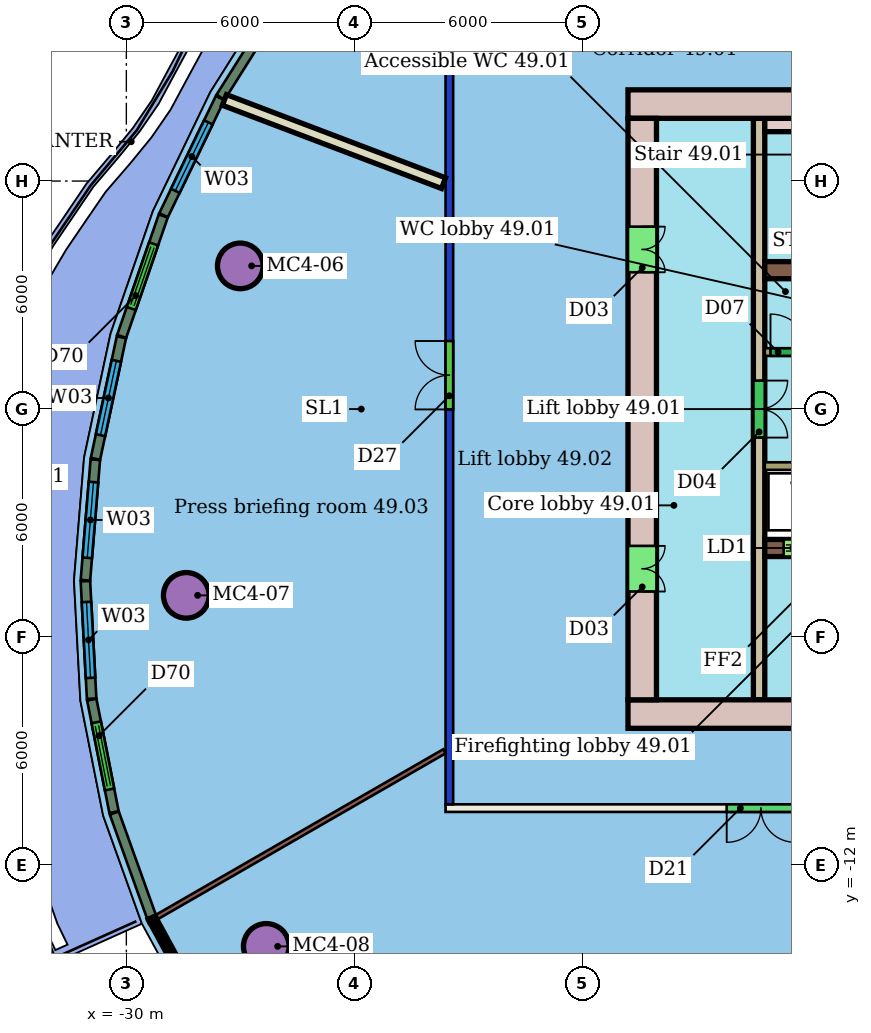
"""IFC4 building model, lengths in metres.
Left out: names, types, materials, properties, quantities, classifications, styles, units other than length and angle.
Written with IfcOpenShell. Run it as: python <this file> out.ifc"""

import sys

from ifc_helpers import new_model, si_unit, direction, frame, frame_2d, origin, origin_2d, place, context, subcontext, project, spatial, rectangle, hollow_circle, extrude, element, fill, save


model = new_model("IFC4")
c1 = context("Model", 3, precision=1e-05, world=origin(), true_north=direction((0.0, 1.0)))
c2 = subcontext(c1, "Body", "Model", "MODEL_VIEW")
j1 = project(units=[si_unit("LENGTHUNIT", "METRE"), si_unit("PLANEANGLEUNIT", "RADIAN")], contexts=[c1])
p1 = place(None, origin())
s1 = spatial("IfcSite", under=j1, at=p1, CompositionType="ELEMENT")
p2 = place(p1, origin())
s2 = spatial("IfcBuilding", under=s1, at=p2, CompositionType="ELEMENT")
p3 = place(p2, frame((0.0, 0.0, 202.9)))
s3 = spatial("IfcBuildingStorey", under=s2, at=p3, CompositionType="ELEMENT", Elevation=202.9)
for number, where, z_axis, x_axis in (
    (1, (-27.003, 3.768, 0.0), (0.0, 0.0, 1.0), (1.0, 0.0, 0.0)),
    (2, (-28.424, -4.901, 0.0), (0.0, 0.0, 1.0), (1.0, 0.0, 0.0)),
    (3, (-26.318, -14.137, 0.0), (0.0, 0.0, 1.0), (1.0, 0.0, 0.0)),
):
    element("IfcColumn", number, at=place(p3, frame(where, z_axis=z_axis, x_axis=x_axis)), inside=s3, PredefinedType="COLUMN", context=c2, shape_type="SweptSolid", body=[
        extrude(hollow_circle(Radius=0.6, WallThickness=0.045, at=origin_2d()), origin(), (0.0, 0.0, 1.0), 3.45),
    ])
p4 = place(p3, frame((9.6, -10.5, 0.0), z_axis=(0.0, 0.0, 1.0), x_axis=(-1.0, 0.0, 0.0)))
e4 = element("IfcWall", 4, at=p4, inside=s3, PredefinedType="PARTITIONING", context=c2, shape_type="SweptSolid", body=[
    extrude(rectangle(XDim=31.2, YDim=0.2, at=frame_2d((15.6, 0.0))), origin(), (0.0, 0.0, 1.0), 3.45),
])
p5 = place(p4, frame((22.002, 0.0, 0.0)))
e5 = element("IfcOpeningElement", 5, at=p5, cuts=e4, PredefinedType="OPENING", context=c2, shape_type="SweptSolid", body=[
    extrude(rectangle(XDim=1.8, YDim=2.1, at=frame_2d((0.9, 1.05))), frame((0.0, 0.11, 0.0), z_axis=(0.0, -1.0, 0.0), x_axis=(1.0, 0.0, 0.0)), (0.0, 0.0, 1.0), 0.22),
])
p6 = place(p4, frame((16.448, 0.0, 0.0)))
e6 = element("IfcOpeningElement", 6, at=p6, cuts=e4, PredefinedType="OPENING", context=c2, shape_type="SweptSolid", body=[
    extrude(rectangle(XDim=1.0, YDim=2.4, at=frame_2d((0.5, 1.2))), frame((0.0, 0.11, 0.0), z_axis=(0.0, -1.0, 0.0), x_axis=(1.0, 0.0, 0.0)), (0.0, 0.0, 1.0), 0.22),
])
p7 = place(p4, frame((8.378, 0.0, 0.0)))
e7 = element("IfcOpeningElement", 7, at=p7, cuts=e4, PredefinedType="OPENING", context=c2, shape_type="SweptSolid", body=[
    extrude(rectangle(XDim=1.0, YDim=2.4, at=frame_2d((0.5, 1.2))), frame((0.0, 0.11, 0.0), z_axis=(0.0, -1.0, 0.0), x_axis=(1.0, 0.0, 0.0)), (0.0, 0.0, 1.0), 0.22),
])
p8 = place(p3, frame((-21.5, -10.4, 0.0), z_axis=(0.0, 0.0, 1.0), x_axis=(0.0, 1.0, 0.0)))
e8 = element("IfcWall", 8, at=p8, inside=s3, PredefinedType="PARTITIONING", context=c2, shape_type="SweptSolid", body=[
    extrude(rectangle(XDim=20.8, YDim=0.2, at=frame_2d((10.4, 0.0))), origin(), (0.0, 0.0, 1.0), 3.05),
])
p9 = place(p8, frame((10.391, 0.0, 0.0)))
e9 = element("IfcOpeningElement", 9, at=p9, cuts=e8, PredefinedType="OPENING", context=c2, shape_type="SweptSolid", body=[
    extrude(rectangle(XDim=1.8, YDim=2.4, at=frame_2d((0.9, 1.2))), frame((0.0, 0.11, 0.0), z_axis=(0.0, -1.0, 0.0), x_axis=(1.0, 0.0, 0.0)), (0.0, 0.0, 1.0), 0.22),
])
p10 = place(p3, frame((-27.419, 8.134, 0.0), z_axis=(0.0, 0.0, 1.0), x_axis=(0.934858486825, -0.355020576322, 0.0)))
e10 = element("IfcWall", 10, at=p10, inside=s3, PredefinedType="PARTITIONING", context=c2, shape_type="SweptSolid", body=[
    extrude(rectangle(XDim=6.167, YDim=0.3, at=frame_2d((3.083, 0.0))), origin(), (0.0, 0.0, 1.0), 3.45),
])
p11 = place(p3, frame((-29.202, -13.367, 0.0), z_axis=(0.0, 0.0, 1.0), x_axis=(0.866494286864, 0.499186989846, 0.0)))
e11 = element("IfcWall", 11, at=p11, inside=s3, PredefinedType="PARTITIONING", context=c2, shape_type="SweptSolid", body=[
    extrude(rectangle(XDim=8.738, YDim=0.125, at=frame_2d((4.369, 0.0))), origin(), (0.0, 0.0, 1.0), 3.45),
])
p12 = place(p3, frame((-12.897, -24.403, 0.0), z_axis=(0.0, 0.0, 1.0), x_axis=(0.271967297308, 0.962306494416, 0.0)))
e12 = element("IfcWall", 12, at=p12, inside=s3, PredefinedType="PARTITIONING", context=c2, shape_type="SweptSolid", body=[
    extrude(rectangle(XDim=14.326, YDim=0.125, at=frame_2d((7.163, 0.0))), origin(), (0.0, 0.0, 1.0), 3.45),
])
p13 = place(p3, frame((-25.69, 11.112, 0.0), z_axis=(0.0, 0.0, 1.0), x_axis=(-0.53307325399, -0.846069090489, 0.0)))
e13 = element("IfcWall", 13, at=p13, inside=s3, PredefinedType="SOLIDWALL", context=c2, shape_type="SweptSolid", body=[
    extrude(rectangle(XDim=3.437, YDim=0.25, at=frame_2d((1.718, 0.0))), origin(), (0.0, 0.0, 1.0), 3.1),
])
p14 = place(p3, frame((-27.533, 8.185, 0.0), z_axis=(0.0, 0.0, 1.0), x_axis=(-0.434561601859, -0.900642112156, 0.0)))
e14 = element("IfcWall", 14, at=p14, inside=s3, PredefinedType="SOLIDWALL", context=c2, shape_type="SweptSolid", body=[
    extrude(rectangle(XDim=3.424, YDim=0.25, at=frame_2d((1.712, 0.0))), origin(), (0.0, 0.0, 1.0), 3.1),
])
p15 = place(p14, frame((0.712, 0.0, 0.9)))
e15 = element("IfcOpeningElement", 15, at=p15, cuts=e14, PredefinedType="OPENING", context=c2, shape_type="SweptSolid", body=[
    extrude(rectangle(XDim=2.0, YDim=2.1, at=frame_2d((1.0, 1.05))), frame((0.0, 0.135, 0.0), z_axis=(0.0, -1.0, 0.0), x_axis=(1.0, 0.0, 0.0)), (0.0, 0.0, 1.0), 0.27),
])
p16 = place(p3, frame((-29.029, 5.081, 0.0), z_axis=(0.0, 0.0, 1.0), x_axis=(-0.326545099428, -0.945181621721, 0.0)))
e16 = element("IfcWall", 16, at=p16, inside=s3, PredefinedType="SOLIDWALL", context=c2, shape_type="SweptSolid", body=[
    extrude(rectangle(XDim=3.352, YDim=0.25, at=frame_2d((1.676, 0.0))), origin(), (0.0, 0.0, 1.0), 3.1),
])
p17 = place(p16, frame((0.776, 0.0, 0.0)))
e17 = element("IfcOpeningElement", 17, at=p17, cuts=e16, PredefinedType="OPENING", context=c2, shape_type="SweptSolid", body=[
    extrude(rectangle(XDim=1.8, YDim=2.4, at=frame_2d((0.9, 1.2))), frame((0.0, 0.135, 0.0), z_axis=(0.0, -1.0, 0.0), x_axis=(1.0, 0.0, 0.0)), (0.0, 0.0, 1.0), 0.27),
])
p18 = place(p3, frame((-30.13, 1.89, 0.0), z_axis=(0.0, 0.0, 1.0), x_axis=(-0.208906976356, -0.977935516908, 0.0)))
e18 = element("IfcWall", 18, at=p18, inside=s3, PredefinedType="SOLIDWALL", context=c2, shape_type="SweptSolid", body=[
    extrude(rectangle(XDim=3.27, YDim=0.25, at=frame_2d((1.635, 0.0))), origin(), (0.0, 0.0, 1.0), 3.1),
])
p19 = place(p18, frame((0.635, 0.0, 0.9)))
e19 = element("IfcOpeningElement", 19, at=p19, cuts=e18, PredefinedType="OPENING", context=c2, shape_type="SweptSolid", body=[
    extrude(rectangle(XDim=2.0, YDim=2.1, at=frame_2d((1.0, 1.05))), frame((0.0, 0.135, 0.0), z_axis=(0.0, -1.0, 0.0), x_axis=(1.0, 0.0, 0.0)), (0.0, 0.0, 1.0), 0.27),
])
p20 = place(p3, frame((-30.816, -1.331, 0.0), z_axis=(0.0, 0.0, 1.0), x_axis=(-0.082004278311, -0.996631977381, 0.0)))
e20 = element("IfcWall", 20, at=p20, inside=s3, PredefinedType="SOLIDWALL", context=c2, shape_type="SweptSolid", body=[
    extrude(rectangle(XDim=3.183, YDim=0.25, at=frame_2d((1.591, 0.0))), origin(), (0.0, 0.0, 1.0), 3.1),
])
p21 = place(p20, frame((0.591, 0.0, 0.9)))
e21 = element("IfcOpeningElement", 21, at=p21, cuts=e20, PredefinedType="OPENING", context=c2, shape_type="SweptSolid", body=[
    extrude(rectangle(XDim=2.0, YDim=2.1, at=frame_2d((1.0, 1.05))), frame((0.0, 0.135, 0.0), z_axis=(0.0, -1.0, 0.0), x_axis=(1.0, 0.0, 0.0)), (0.0, 0.0, 1.0), 0.27),
])
p22 = place(p3, frame((-31.078, -4.528, 0.0), z_axis=(0.0, 0.0, 1.0), x_axis=(0.053150699104, -0.998586502605, 0.0)))
e22 = element("IfcWall", 22, at=p22, inside=s3, PredefinedType="SOLIDWALL", context=c2, shape_type="SweptSolid", body=[
    extrude(rectangle(XDim=3.096, YDim=0.25, at=frame_2d((1.548, 0.0))), origin(), (0.0, 0.0, 1.0), 3.1),
])
p23 = place(p22, frame((0.548, 0.0, 0.9)))
e23 = element("IfcOpeningElement", 23, at=p23, cuts=e22, PredefinedType="OPENING", context=c2, shape_type="SweptSolid", body=[
    extrude(rectangle(XDim=2.0, YDim=2.1, at=frame_2d((1.0, 1.05))), frame((0.0, 0.135, 0.0), z_axis=(0.0, -1.0, 0.0), x_axis=(1.0, 0.0, 0.0)), (0.0, 0.0, 1.0), 0.27),
])
p24 = place(p3, frame((-30.91, -7.645, 0.0), z_axis=(0.0, 0.0, 1.0), x_axis=(0.194200963519, -0.980961765702, 0.0)))
e24 = element("IfcWall", 24, at=p24, inside=s3, PredefinedType="SOLIDWALL", context=c2, shape_type="SweptSolid", body=[
    extrude(rectangle(XDim=3.016, YDim=0.25, at=frame_2d((1.508, 0.0))), origin(), (0.0, 0.0, 1.0), 3.1),
])
p25 = place(p24, frame((0.608, 0.0, 0.0)))
e25 = element("IfcOpeningElement", 25, at=p25, cuts=e24, PredefinedType="OPENING", context=c2, shape_type="SweptSolid", body=[
    extrude(rectangle(XDim=1.8, YDim=2.4, at=frame_2d((0.9, 1.2))), frame((0.0, 0.135, 0.0), z_axis=(0.0, -1.0, 0.0), x_axis=(1.0, 0.0, 0.0)), (0.0, 0.0, 1.0), 0.27),
])
p26 = place(p3, frame((-30.317, -10.629, 0.0), z_axis=(0.0, 0.0, 1.0), x_axis=(0.337681671404, -0.941260372478, 0.0)))
e26 = element("IfcWall", 26, at=p26, inside=s3, PredefinedType="SOLIDWALL", context=c2, shape_type="SweptSolid", body=[
    extrude(rectangle(XDim=2.908, YDim=0.25, at=frame_2d((1.454, 0.0))), origin(), (0.0, 0.0, 1.0), 3.1),
])
p27 = place(p3, frame((-6.0, 8.025, 0.0), z_axis=(0.0, 0.0, 1.0), x_axis=(-1.0, 0.0, 0.0)))
e27 = element("IfcWall", 27, at=p27, inside=s3, PredefinedType="SHEAR", context=c2, shape_type="SweptSolid", body=[
    extrude(rectangle(XDim=10.8, YDim=0.75, at=frame_2d((5.4, 0.0))), origin(), (0.0, 0.0, 1.0), 3.3),
])
p28 = place(p27, frame((5.2, 0.0, 0.0)))
e28 = element("IfcOpeningElement", 28, at=p28, cuts=e27, PredefinedType="OPENING", context=c2, shape_type="SweptSolid", body=[
    extrude(rectangle(XDim=1.2, YDim=2.1, at=frame_2d((0.6, 1.05))), frame((0.0, 0.385, 0.0), z_axis=(0.0, -1.0, 0.0), x_axis=(1.0, 0.0, 0.0)), (0.0, 0.0, 1.0), 0.77),
])
p29 = place(p3, frame((-16.8, -8.025, 0.0), z_axis=(0.0, 0.0, 1.0), x_axis=(1.0, 0.0, 0.0)))
e29 = element("IfcWall", 29, at=p29, inside=s3, PredefinedType="SHEAR", context=c2, shape_type="SweptSolid", body=[
    extrude(rectangle(XDim=21.6, YDim=0.75, at=frame_2d((10.8, 0.0))), origin(), (0.0, 0.0, 1.0), 3.3),
])
p30 = place(p29, frame((4.8, 0.0, 0.0)))
e30 = element("IfcOpeningElement", 30, at=p30, cuts=e29, PredefinedType="OPENING", context=c2, shape_type="SweptSolid", body=[
    extrude(rectangle(XDim=1.2, YDim=2.1, at=frame_2d((0.6, 1.05))), frame((0.0, 0.385, 0.0), z_axis=(0.0, -1.0, 0.0), x_axis=(1.0, 0.0, 0.0)), (0.0, 0.0, 1.0), 0.77),
])
p31 = place(p3, frame((-16.425, 7.65, 0.0), z_axis=(0.0, 0.0, 1.0), x_axis=(0.0, -1.0, 0.0)))
e31 = element("IfcWall", 31, at=p31, inside=s3, PredefinedType="SHEAR", context=c2, shape_type="SweptSolid", body=[
    extrude(rectangle(XDim=15.3, YDim=0.75, at=frame_2d((7.65, 0.0))), origin(), (0.0, 0.0, 1.0), 3.3),
])
p32 = place(p31, frame((11.25, 0.0, 0.0)))
e32 = element("IfcOpeningElement", 32, at=p32, cuts=e31, PredefinedType="OPENING", context=c2, shape_type="SweptSolid", body=[
    extrude(rectangle(XDim=1.2, YDim=2.1, at=frame_2d((0.6, 1.05))), frame((0.0, 0.385, 0.0), z_axis=(0.0, -1.0, 0.0), x_axis=(1.0, 0.0, 0.0)), (0.0, 0.0, 1.0), 0.77),
])
p33 = place(p31, frame((2.85, 0.0, 0.0)))
e33 = element("IfcOpeningElement", 33, at=p33, cuts=e31, PredefinedType="OPENING", context=c2, shape_type="SweptSolid", body=[
    extrude(rectangle(XDim=1.2, YDim=2.1, at=frame_2d((0.6, 1.05))), frame((0.0, 0.385, 0.0), z_axis=(0.0, -1.0, 0.0), x_axis=(1.0, 0.0, 0.0)), (0.0, 0.0, 1.0), 0.77),
])
p34 = place(p3, frame((-13.2, 3.655, 0.0), z_axis=(0.0, 0.0, 1.0), x_axis=(1.0, 0.0, 0.0)))
e34 = element("IfcWall", 34, at=p34, inside=s3, PredefinedType="SHEAR", context=c2, shape_type="SweptSolid", body=[
    extrude(rectangle(XDim=7.2, YDim=0.45, at=frame_2d((3.6, 0.0))), origin(), (0.0, 0.0, 1.0), 3.3),
])
p35 = place(p3, frame((-13.2, -3.655, 0.0), z_axis=(0.0, 0.0, 1.0), x_axis=(1.0, 0.0, 0.0)))
e35 = element("IfcWall", 35, at=p35, inside=s3, PredefinedType="SHEAR", context=c2, shape_type="SweptSolid", body=[
    extrude(rectangle(XDim=7.2, YDim=0.45, at=frame_2d((3.6, 0.0))), origin(), (0.0, 0.0, 1.0), 3.3),
])
p36 = place(p35, frame((0.496, 0.0, 0.0)))
e36 = element("IfcOpeningElement", 36, at=p36, cuts=e35, PredefinedType="OPENING", context=c2, shape_type="SweptSolid", body=[
    extrude(rectangle(XDim=1.2, YDim=2.1, at=frame_2d((0.6, 1.05))), frame((0.0, 0.235, 0.0), z_axis=(0.0, -1.0, 0.0), x_axis=(1.0, 0.0, 0.0)), (0.0, 0.0, 1.0), 0.47),
])
p37 = place(p35, frame((2.938, 0.0, 0.0)))
e37 = element("IfcOpeningElement", 37, at=p37, cuts=e35, PredefinedType="OPENING", context=c2, shape_type="SweptSolid", body=[
    extrude(rectangle(XDim=1.2, YDim=2.1, at=frame_2d((0.6, 1.05))), frame((0.0, 0.235, 0.0), z_axis=(0.0, -1.0, 0.0), x_axis=(1.0, 0.0, 0.0)), (0.0, 0.0, 1.0), 0.47),
])
p38 = place(p3, frame((-13.35, 7.65, 0.0), z_axis=(0.0, 0.0, 1.0), x_axis=(0.0, -1.0, 0.0)))
e38 = element("IfcWall", 38, at=p38, inside=s3, PredefinedType="SHEAR", context=c2, shape_type="SweptSolid", body=[
    extrude(rectangle(XDim=15.3, YDim=0.3, at=frame_2d((7.65, 0.0))), origin(), (0.0, 0.0, 1.0), 3.3),
])
p39 = place(p38, frame((6.9, 0.0, 0.0)))
e39 = element("IfcOpeningElement", 39, at=p39, cuts=e38, PredefinedType="OPENING", context=c2, shape_type="SweptSolid", body=[
    extrude(rectangle(XDim=1.5, YDim=2.1, at=frame_2d((0.75, 1.05))), frame((0.0, 0.16, 0.0), z_axis=(0.0, -1.0, 0.0), x_axis=(1.0, 0.0, 0.0)), (0.0, 0.0, 1.0), 0.32),
])
p40 = place(p3, frame((-13.2, 1.5, 0.0), z_axis=(0.0, 0.0, 1.0), x_axis=(1.0, 0.0, 0.0)))
e40 = element("IfcWall", 40, at=p40, inside=s3, PredefinedType="SHEAR", context=c2, shape_type="SweptSolid", body=[
    extrude(rectangle(XDim=14.4, YDim=0.2, at=frame_2d((7.2, 0.0))), origin(), (0.0, 0.0, 1.0), 3.3),
])
p41 = place(p40, frame((10.312, 0.0, 0.0)))
e41 = element("IfcOpeningElement", 41, at=p41, cuts=e40, PredefinedType="OPENING", context=c2, shape_type="SweptSolid", body=[
    extrude(rectangle(XDim=1.1, YDim=2.1, at=frame_2d((0.55, 1.05))), frame((0.0, 0.11, 0.0), z_axis=(0.0, -1.0, 0.0), x_axis=(1.0, 0.0, 0.0)), (0.0, 0.0, 1.0), 0.22),
])
p42 = place(p40, frame((12.754, 0.0, 0.0)))
e42 = element("IfcOpeningElement", 42, at=p42, cuts=e40, PredefinedType="OPENING", context=c2, shape_type="SweptSolid", body=[
    extrude(rectangle(XDim=1.1, YDim=2.1, at=frame_2d((0.55, 1.05))), frame((0.0, 0.11, 0.0), z_axis=(0.0, -1.0, 0.0), x_axis=(1.0, 0.0, 0.0)), (0.0, 0.0, 1.0), 0.22),
])
p43 = place(p40, frame((0.15, 0.0, 0.0)))
e43 = element("IfcOpeningElement", 43, at=p43, cuts=e40, PredefinedType="OPENING", context=c2, shape_type="SweptSolid", body=[
    extrude(rectangle(XDim=1.0, YDim=2.1, at=frame_2d((0.5, 1.05))), frame((0.0, 0.11, 0.0), z_axis=(0.0, -1.0, 0.0), x_axis=(1.0, 0.0, 0.0)), (0.0, 0.0, 1.0), 0.22),
])
p44 = place(p40, frame((3.365, 0.0, 0.0)))
e44 = element("IfcOpeningElement", 44, at=p44, cuts=e40, PredefinedType="OPENING", context=c2, shape_type="SweptSolid", body=[
    extrude(rectangle(XDim=1.0, YDim=2.1, at=frame_2d((0.5, 1.05))), frame((0.0, 0.11, 0.0), z_axis=(0.0, -1.0, 0.0), x_axis=(1.0, 0.0, 0.0)), (0.0, 0.0, 1.0), 0.22),
])
p45 = place(p40, frame((8.467, 0.0, 0.0)))
e45 = element("IfcOpeningElement", 45, at=p45, cuts=e40, PredefinedType="OPENING", context=c2, shape_type="SweptSolid", body=[
    extrude(rectangle(XDim=0.9, YDim=2.1, at=frame_2d((0.45, 1.05))), frame((0.0, 0.11, 0.0), z_axis=(0.0, -1.0, 0.0), x_axis=(1.0, 0.0, 0.0)), (0.0, 0.0, 1.0), 0.22),
])
p46 = place(p3, frame((1.2, -1.5, 0.0), z_axis=(0.0, 0.0, 1.0), x_axis=(-1.0, 0.0, 0.0)))
e46 = element("IfcWall", 46, at=p46, inside=s3, PredefinedType="SHEAR", context=c2, shape_type="SweptSolid", body=[
    extrude(rectangle(XDim=14.4, YDim=0.2, at=frame_2d((7.2, 0.0))), origin(), (0.0, 0.0, 1.0), 3.3),
])
p47 = place(p46, frame((7.821, 0.0, 0.0)))
e47 = element("IfcOpeningElement", 47, at=p47, cuts=e46, PredefinedType="OPENING", context=c2, shape_type="SweptSolid", body=[
    extrude(rectangle(XDim=1.2, YDim=2.1, at=frame_2d((0.6, 1.05))), frame((0.0, 0.11, 0.0), z_axis=(0.0, -1.0, 0.0), x_axis=(1.0, 0.0, 0.0)), (0.0, 0.0, 1.0), 0.22),
])
p48 = place(p46, frame((0.546, 0.0, 0.0)))
e48 = element("IfcOpeningElement", 48, at=p48, cuts=e46, PredefinedType="OPENING", context=c2, shape_type="SweptSolid", body=[
    extrude(rectangle(XDim=1.1, YDim=2.1, at=frame_2d((0.55, 1.05))), frame((0.0, 0.11, 0.0), z_axis=(0.0, -1.0, 0.0), x_axis=(1.0, 0.0, 0.0)), (0.0, 0.0, 1.0), 0.22),
])
p49 = place(p46, frame((2.592, 0.0, 0.0)))
e49 = element("IfcOpeningElement", 49, at=p49, cuts=e46, PredefinedType="OPENING", context=c2, shape_type="SweptSolid", body=[
    extrude(rectangle(XDim=0.9, YDim=2.1, at=frame_2d((0.45, 1.05))), frame((0.0, 0.11, 0.0), z_axis=(0.0, -1.0, 0.0), x_axis=(1.0, 0.0, 0.0)), (0.0, 0.0, 1.0), 0.22),
])
p50 = place(p3, frame((-13.2, 7.475, 0.0), z_axis=(0.0, 0.0, 1.0), x_axis=(1.0, 0.0, 0.0)))
e50 = element("IfcWall", 50, at=p50, inside=s3, PredefinedType="SHEAR", context=c2, shape_type="SweptSolid", body=[
    extrude(rectangle(XDim=0.8, YDim=0.35, at=frame_2d((0.4, 0.0))), origin(), (0.0, 0.0, 1.0), 3.3),
])
p51 = place(p9, origin())
e51 = element("IfcDoor", 51, at=p51, inside=s3, OperationType="DOUBLE_DOOR_SINGLE_SWING", PredefinedType="DOOR", context=c2, shape_type="SweptSolid", body=[
    extrude(rectangle(XDim=1.8, YDim=2.4, at=frame_2d((0.9, 1.2))), frame((0.0, 0.025, 0.0), z_axis=(0.0, -1.0, 0.0), x_axis=(1.0, 0.0, 0.0)), (0.0, 0.0, 1.0), 0.05),
])
fill(e9, e51)
p52 = place(p5, origin())
e52 = element("IfcDoor", 52, at=p52, inside=s3, OperationType="DOUBLE_DOOR_SINGLE_SWING", PredefinedType="DOOR", context=c2, shape_type="SweptSolid", body=[
    extrude(rectangle(XDim=1.8, YDim=2.1, at=frame_2d((0.9, 1.05))), frame((0.0, 0.025, 0.0), z_axis=(0.0, -1.0, 0.0), x_axis=(1.0, 0.0, 0.0)), (0.0, 0.0, 1.0), 0.05),
])
fill(e5, e52)
p53 = place(p15, origin())
e53 = element("IfcWindow", 53, at=p53, inside=s3, PartitioningType="SINGLE_PANEL", PredefinedType="WINDOW", context=c2, shape_type="SweptSolid", body=[
    extrude(rectangle(XDim=2.0, YDim=2.1, at=frame_2d((1.0, 1.05))), frame((0.0, 0.03, 0.0), z_axis=(0.0, -1.0, 0.0), x_axis=(1.0, 0.0, 0.0)), (0.0, 0.0, 1.0), 0.06),
])
fill(e15, e53)
p54 = place(p17, origin())
e54 = element("IfcDoor", 54, at=p54, inside=s3, OperationType="DOUBLE_DOOR_SLIDING", PredefinedType="DOOR", context=c2, shape_type="SweptSolid", body=[
    extrude(rectangle(XDim=1.8, YDim=2.4, at=frame_2d((0.9, 1.2))), frame((0.0, 0.025, 0.0), z_axis=(0.0, -1.0, 0.0), x_axis=(1.0, 0.0, 0.0)), (0.0, 0.0, 1.0), 0.05),
])
fill(e17, e54)
p55 = place(p19, origin())
e55 = element("IfcWindow", 55, at=p55, inside=s3, PartitioningType="SINGLE_PANEL", PredefinedType="WINDOW", context=c2, shape_type="SweptSolid", body=[
    extrude(rectangle(XDim=2.0, YDim=2.1, at=frame_2d((1.0, 1.05))), frame((0.0, 0.03, 0.0), z_axis=(0.0, -1.0, 0.0), x_axis=(1.0, 0.0, 0.0)), (0.0, 0.0, 1.0), 0.06),
])
fill(e19, e55)
p56 = place(p21, origin())
e56 = element("IfcWindow", 56, at=p56, inside=s3, PartitioningType="SINGLE_PANEL", PredefinedType="WINDOW", context=c2, shape_type="SweptSolid", body=[
    extrude(rectangle(XDim=2.0, YDim=2.1, at=frame_2d((1.0, 1.05))), frame((0.0, 0.03, 0.0), z_axis=(0.0, -1.0, 0.0), x_axis=(1.0, 0.0, 0.0)), (0.0, 0.0, 1.0), 0.06),
])
fill(e21, e56)
p57 = place(p23, origin())
e57 = element("IfcWindow", 57, at=p57, inside=s3, PartitioningType="SINGLE_PANEL", PredefinedType="WINDOW", context=c2, shape_type="SweptSolid", body=[
    extrude(rectangle(XDim=2.0, YDim=2.1, at=frame_2d((1.0, 1.05))), frame((0.0, 0.03, 0.0), z_axis=(0.0, -1.0, 0.0), x_axis=(1.0, 0.0, 0.0)), (0.0, 0.0, 1.0), 0.06),
])
fill(e23, e57)
p58 = place(p25, origin())
e58 = element("IfcDoor", 58, at=p58, inside=s3, OperationType="DOUBLE_DOOR_SLIDING", PredefinedType="DOOR", context=c2, shape_type="SweptSolid", body=[
    extrude(rectangle(XDim=1.8, YDim=2.4, at=frame_2d((0.9, 1.2))), frame((0.0, 0.025, 0.0), z_axis=(0.0, -1.0, 0.0), x_axis=(1.0, 0.0, 0.0)), (0.0, 0.0, 1.0), 0.05),
])
fill(e25, e58)
p59 = place(p32, origin())
e59 = element("IfcDoor", 59, at=p59, inside=s3, OperationType="DOUBLE_DOOR_SINGLE_SWING", PredefinedType="NOTDEFINED", context=c2, shape_type="SweptSolid", body=[
    extrude(rectangle(XDim=1.2, YDim=2.1, at=frame_2d((0.6, 1.05))), frame((0.0, 0.025, 0.0), z_axis=(0.0, -1.0, 0.0), x_axis=(1.0, 0.0, 0.0)), (0.0, 0.0, 1.0), 0.05),
])
fill(e32, e59)
p60 = place(p33, origin())
e60 = element("IfcDoor", 60, at=p60, inside=s3, OperationType="DOUBLE_DOOR_SINGLE_SWING", PredefinedType="NOTDEFINED", context=c2, shape_type="SweptSolid", body=[
    extrude(rectangle(XDim=1.2, YDim=2.1, at=frame_2d((0.6, 1.05))), frame((0.0, 0.025, 0.0), z_axis=(0.0, -1.0, 0.0), x_axis=(1.0, 0.0, 0.0)), (0.0, 0.0, 1.0), 0.05),
])
fill(e33, e60)
p61 = place(p36, origin())
e61 = element("IfcDoor", 61, at=p61, inside=s3, OperationType="DOUBLE_DOOR_SLIDING", PredefinedType="NOTDEFINED", context=c2, shape_type="SweptSolid", body=[
    extrude(rectangle(XDim=1.2, YDim=2.1, at=frame_2d((0.6, 1.05))), frame((0.0, 0.025, 0.0), z_axis=(0.0, -1.0, 0.0), x_axis=(1.0, 0.0, 0.0)), (0.0, 0.0, 1.0), 0.05),
])
fill(e36, e61)
p62 = place(p39, origin())
e62 = element("IfcDoor", 62, at=p62, inside=s3, OperationType="DOUBLE_DOOR_SINGLE_SWING", PredefinedType="NOTDEFINED", context=c2, shape_type="SweptSolid", body=[
    extrude(rectangle(XDim=1.5, YDim=2.1, at=frame_2d((0.75, 1.05))), frame((0.0, 0.025, 0.0), z_axis=(0.0, -1.0, 0.0), x_axis=(1.0, 0.0, 0.0)), (0.0, 0.0, 1.0), 0.05),
])
fill(e39, e62)
p63 = place(p43, origin())
e63 = element("IfcDoor", 63, at=p63, inside=s3, OperationType="SINGLE_SWING_LEFT", PredefinedType="NOTDEFINED", context=c2, shape_type="SweptSolid", body=[
    extrude(rectangle(XDim=1.0, YDim=2.1, at=frame_2d((0.5, 1.05))), frame((0.0, 0.025, 0.0), z_axis=(0.0, -1.0, 0.0), x_axis=(1.0, 0.0, 0.0)), (0.0, 0.0, 1.0), 0.05),
])
fill(e43, e63)
save(model, sys.argv[1])
